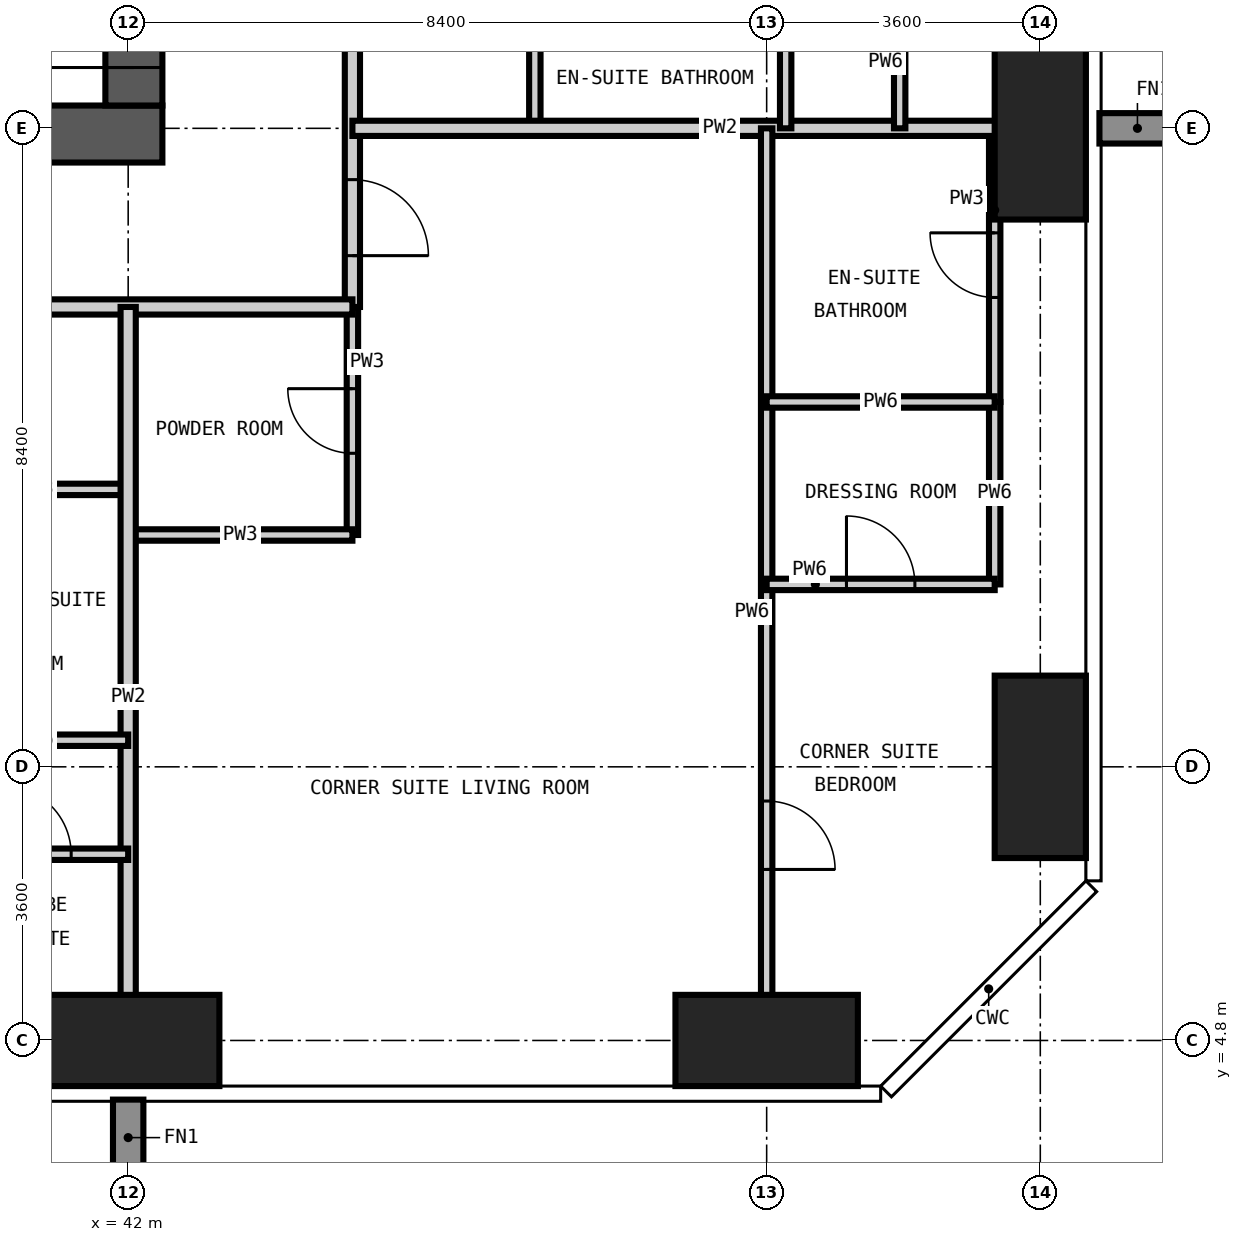
"""IFC4 building model, lengths in metres.
Left out: names, types, materials, properties, quantities, classifications, styles, units other than length and angle.
Written with IfcOpenShell. Run it as: python <this file> out.ifc"""

import sys

from ifc_helpers import new_model, si_unit, direction, frame, frame_2d, origin, origin_2d, place, context, subcontext, project, spatial, rectangle, extrude, element, fill, save


model = new_model("IFC4")
c1 = context("Model", 3, precision=1e-05, world=origin(), true_north=direction((0.0, 1.0)))
c2 = subcontext(c1, "Body", "Model", "MODEL_VIEW")
j1 = project(units=[si_unit("LENGTHUNIT", "METRE"), si_unit("PLANEANGLEUNIT", "RADIAN")], contexts=[c1])
p1 = place(None, origin())
s1 = spatial("IfcSite", under=j1, at=p1, CompositionType="ELEMENT")
p2 = place(p1, origin())
s2 = spatial("IfcBuilding", under=s1, at=p2, CompositionType="ELEMENT")
p3 = place(p2, frame((0.0, 0.0, 177.0)))
s3 = spatial("IfcBuildingStorey", under=s2, at=p3, CompositionType="ELEMENT", Elevation=177.0)
for number, where, z_axis, x_axis in (
    (1, (42.0, 4.8, -0.35), (0.0, 0.0, 1.0), (1.0, 0.0, 0.0)),
    (2, (50.4, 4.8, -0.35), (0.0, 0.0, 1.0), (1.0, 0.0, 0.0)),
):
    element("IfcColumn", number, at=place(p3, frame(where, z_axis=z_axis, x_axis=x_axis)), inside=s3, PredefinedType="COLUMN", context=c2, shape_type="SweptSolid", body=[
        extrude(rectangle(XDim=2.4, YDim=1.2, at=origin_2d()), origin(), (0.0, 0.0, 1.0), 3.6),
    ])
for number, where, z_axis, x_axis in (
    (3, (54.0, 8.4, -0.35), (0.0, 0.0, 1.0), (1.0, 0.0, 0.0)),
    (4, (54.0, 16.8, -0.35), (0.0, 0.0, 1.0), (1.0, 0.0, 0.0)),
):
    element("IfcColumn", number, at=place(p3, frame(where, z_axis=z_axis, x_axis=x_axis)), inside=s3, PredefinedType="COLUMN", context=c2, shape_type="SweptSolid", body=[
        extrude(rectangle(XDim=1.2, YDim=2.4, at=origin_2d()), origin(), (0.0, 0.0, 1.0), 3.6),
    ])
p4 = place(p3, frame((16.35, 16.725, -0.35), z_axis=(0.0, 0.0, 1.0), x_axis=(1.0, 0.0, 0.0)))
e5 = element("IfcWall", 5, at=p4, inside=s3, PredefinedType="SHEAR", context=c2, shape_type="SweptSolid", body=[
    extrude(rectangle(XDim=26.1, YDim=0.75, at=frame_2d((13.05, 0.0))), origin(), (0.0, 0.0, 1.0), 3.6),
])
p5 = place(p4, frame((12.55, 0.0, 0.35)))
e6 = element("IfcOpeningElement", 6, at=p5, cuts=e5, PredefinedType="OPENING", context=c2, shape_type="SweptSolid", body=[
    extrude(rectangle(XDim=1.0, YDim=2.1, at=frame_2d((0.5, 1.05))), frame((0.0, 0.385, 0.0), z_axis=(0.0, -1.0, 0.0), x_axis=(1.0, 0.0, 0.0)), (0.0, 0.0, 1.0), 0.77),
])
p6 = place(p4, frame((18.85, 0.0, 0.35)))
e7 = element("IfcOpeningElement", 7, at=p6, cuts=e5, PredefinedType="OPENING", context=c2, shape_type="SweptSolid", body=[
    extrude(rectangle(XDim=1.0, YDim=2.1, at=frame_2d((0.5, 1.05))), frame((0.0, 0.385, 0.0), z_axis=(0.0, -1.0, 0.0), x_axis=(1.0, 0.0, 0.0)), (0.0, 0.0, 1.0), 0.77),
])
p7 = place(p3, frame((42.075, 17.1, -0.35), z_axis=(0.0, 0.0, 1.0), x_axis=(0.0, 1.0, 0.0)))
e8 = element("IfcWall", 8, at=p7, inside=s3, PredefinedType="SHEAR", context=c2, shape_type="SweptSolid", body=[
    extrude(rectangle(XDim=24.6, YDim=0.75, at=frame_2d((12.3, 0.0))), origin(), (0.0, 0.0, 1.0), 3.6),
])
p8 = place(p7, frame((0.5, 0.0, 0.35)))
e9 = element("IfcOpeningElement", 9, at=p8, cuts=e8, PredefinedType="OPENING", context=c2, shape_type="SweptSolid", body=[
    extrude(rectangle(XDim=1.2, YDim=2.2, at=frame_2d((0.6, 1.1))), frame((0.0, 0.385, 0.0), z_axis=(0.0, -1.0, 0.0), x_axis=(1.0, 0.0, 0.0)), (0.0, 0.0, 1.0), 0.77),
])
p9 = place(p7, frame((11.8, 0.0, 0.35)))
e10 = element("IfcOpeningElement", 10, at=p9, cuts=e8, PredefinedType="OPENING", context=c2, shape_type="SweptSolid", body=[
    extrude(rectangle(XDim=1.0, YDim=2.1, at=frame_2d((0.5, 1.05))), frame((0.0, 0.385, 0.0), z_axis=(0.0, -1.0, 0.0), x_axis=(1.0, 0.0, 0.0)), (0.0, 0.0, 1.0), 0.77),
])
p10 = place(p7, frame((20.2, 0.0, 0.35)))
e11 = element("IfcOpeningElement", 11, at=p10, cuts=e8, PredefinedType="OPENING", context=c2, shape_type="SweptSolid", body=[
    extrude(rectangle(XDim=1.0, YDim=2.1, at=frame_2d((0.5, 1.05))), frame((0.0, 0.385, 0.0), z_axis=(0.0, -1.0, 0.0), x_axis=(1.0, 0.0, 0.0)), (0.0, 0.0, 1.0), 0.77),
])
p11 = place(p3, frame((44.95, 11.45, 0.0), z_axis=(0.0, 0.0, 1.0), x_axis=(0.0, 1.0, 0.0)))
e12 = element("IfcWall", 12, at=p11, inside=s3, PredefinedType="PARTITIONING", context=c2, shape_type="SweptSolid", body=[
    extrude(rectangle(XDim=3.0, YDim=0.15, at=frame_2d((1.5, 0.0))), origin(), (0.0, 0.0, 1.0), 3.25),
])
p12 = place(p11, frame((1.075, 0.0, 0.0)))
e13 = element("IfcOpeningElement", 13, at=p12, cuts=e12, PredefinedType="OPENING", context=c2, shape_type="SweptSolid", body=[
    extrude(rectangle(XDim=0.85, YDim=2.1, at=frame_2d((0.425, 1.05))), frame((0.0, 0.085, 0.0), z_axis=(0.0, -1.0, 0.0), x_axis=(1.0, 0.0, 0.0)), (0.0, 0.0, 1.0), 0.17),
])
p13 = place(p3, frame((47.35, 16.8, 0.0), z_axis=(0.0, 0.0, 1.0), x_axis=(0.0, 1.0, 0.0)))
e14 = element("IfcWall", 14, at=p13, inside=s3, PredefinedType="PARTITIONING", context=c2, shape_type="SweptSolid", body=[
    extrude(rectangle(XDim=2.4, YDim=0.15, at=frame_2d((1.2, 0.0))), origin(), (0.0, 0.0, 1.0), 3.25),
])
p14 = place(p3, frame((53.4, 13.2, 0.0), z_axis=(0.0, 0.0, 1.0), x_axis=(0.0, 1.0, 0.0)))
e15 = element("IfcWall", 15, at=p14, inside=s3, PredefinedType="PARTITIONING", context=c2, shape_type="SweptSolid", body=[
    extrude(rectangle(XDim=3.6, YDim=0.15, at=frame_2d((1.8, 0.0))), origin(), (0.0, 0.0, 1.0), 3.25),
])
p15 = place(p14, frame((1.375, 0.0, 0.0)))
e16 = element("IfcOpeningElement", 16, at=p15, cuts=e15, PredefinedType="OPENING", context=c2, shape_type="SweptSolid", body=[
    extrude(rectangle(XDim=0.85, YDim=2.1, at=frame_2d((0.425, 1.05))), frame((0.0, 0.085, 0.0), z_axis=(0.0, -1.0, 0.0), x_axis=(1.0, 0.0, 0.0)), (0.0, 0.0, 1.0), 0.17),
])
p16 = place(p3, frame((42.0, 11.45, 0.0), z_axis=(0.0, 0.0, 1.0), x_axis=(1.0, 0.0, 0.0)))
e17 = element("IfcWall", 17, at=p16, inside=s3, PredefinedType="PARTITIONING", context=c2, shape_type="SweptSolid", body=[
    extrude(rectangle(XDim=2.95, YDim=0.15, at=frame_2d((1.475, 0.0))), origin(), (0.0, 0.0, 1.0), 3.25),
])
p17 = place(p3, frame((39.6, 12.05, 0.0), z_axis=(0.0, 0.0, 1.0), x_axis=(1.0, 0.0, 0.0)))
e18 = element("IfcWall", 18, at=p17, inside=s3, PredefinedType="PARTITIONING", context=c2, shape_type="SweptSolid", body=[
    extrude(rectangle(XDim=2.4, YDim=0.15, at=frame_2d((1.2, 0.0))), origin(), (0.0, 0.0, 1.0), 3.25),
])
p18 = place(p3, frame((44.95, 45.55, 0.0), z_axis=(0.0, 0.0, 1.0), x_axis=(0.0, -1.0, 0.0)))
e19 = element("IfcWall", 19, at=p18, inside=s3, PredefinedType="PARTITIONING", context=c2, shape_type="SweptSolid", body=[
    extrude(rectangle(XDim=31.1, YDim=0.2, at=frame_2d((15.55, 0.0))), origin(), (0.0, 0.0, 1.0), 3.25),
])
p19 = place(p18, frame((26.15, 0.0, 0.0)))
e20 = element("IfcOpeningElement", 20, at=p19, cuts=e19, PredefinedType="OPENING", context=c2, shape_type="SweptSolid", body=[
    extrude(rectangle(XDim=1.0, YDim=2.2, at=frame_2d((0.5, 1.1))), frame((0.0, 0.11, 0.0), z_axis=(0.0, -1.0, 0.0), x_axis=(1.0, 0.0, 0.0)), (0.0, 0.0, 1.0), 0.22),
])
p20 = place(p18, frame((21.95, 0.0, 0.0)))
e21 = element("IfcOpeningElement", 21, at=p20, cuts=e19, PredefinedType="OPENING", context=c2, shape_type="SweptSolid", body=[
    extrude(rectangle(XDim=1.0, YDim=2.2, at=frame_2d((0.5, 1.1))), frame((0.0, 0.11, 0.0), z_axis=(0.0, -1.0, 0.0), x_axis=(1.0, 0.0, 0.0)), (0.0, 0.0, 1.0), 0.22),
])
p21 = place(p18, frame((17.75, 0.0, 0.0)))
e22 = element("IfcOpeningElement", 22, at=p21, cuts=e19, PredefinedType="OPENING", context=c2, shape_type="SweptSolid", body=[
    extrude(rectangle(XDim=1.0, YDim=2.2, at=frame_2d((0.5, 1.1))), frame((0.0, 0.11, 0.0), z_axis=(0.0, -1.0, 0.0), x_axis=(1.0, 0.0, 0.0)), (0.0, 0.0, 1.0), 0.22),
])
p22 = place(p18, frame((13.55, 0.0, 0.0)))
e23 = element("IfcOpeningElement", 23, at=p22, cuts=e19, PredefinedType="OPENING", context=c2, shape_type="SweptSolid", body=[
    extrude(rectangle(XDim=1.0, YDim=2.2, at=frame_2d((0.5, 1.1))), frame((0.0, 0.11, 0.0), z_axis=(0.0, -1.0, 0.0), x_axis=(1.0, 0.0, 0.0)), (0.0, 0.0, 1.0), 0.22),
])
p23 = place(p18, frame((9.35, 0.0, 0.0)))
e24 = element("IfcOpeningElement", 24, at=p23, cuts=e19, PredefinedType="OPENING", context=c2, shape_type="SweptSolid", body=[
    extrude(rectangle(XDim=1.0, YDim=2.2, at=frame_2d((0.5, 1.1))), frame((0.0, 0.11, 0.0), z_axis=(0.0, -1.0, 0.0), x_axis=(1.0, 0.0, 0.0)), (0.0, 0.0, 1.0), 0.22),
])
p24 = place(p18, frame((5.15, 0.0, 0.0)))
e25 = element("IfcOpeningElement", 25, at=p24, cuts=e19, PredefinedType="OPENING", context=c2, shape_type="SweptSolid", body=[
    extrude(rectangle(XDim=1.0, YDim=2.2, at=frame_2d((0.5, 1.1))), frame((0.0, 0.11, 0.0), z_axis=(0.0, -1.0, 0.0), x_axis=(1.0, 0.0, 0.0)), (0.0, 0.0, 1.0), 0.22),
])
p25 = place(p18, frame((29.425, 0.0, 0.0)))
e26 = element("IfcOpeningElement", 26, at=p25, cuts=e19, PredefinedType="OPENING", context=c2, shape_type="SweptSolid", body=[
    extrude(rectangle(XDim=1.0, YDim=2.2, at=frame_2d((0.5, 1.1))), frame((0.0, 0.11, 0.0), z_axis=(0.0, -1.0, 0.0), x_axis=(1.0, 0.0, 0.0)), (0.0, 0.0, 1.0), 0.22),
])
p26 = place(p18, frame((1.275, 0.0, 0.0)))
e27 = element("IfcOpeningElement", 27, at=p26, cuts=e19, PredefinedType="OPENING", context=c2, shape_type="SweptSolid", body=[
    extrude(rectangle(XDim=1.0, YDim=2.2, at=frame_2d((0.5, 1.1))), frame((0.0, 0.11, 0.0), z_axis=(0.0, -1.0, 0.0), x_axis=(1.0, 0.0, 0.0)), (0.0, 0.0, 1.0), 0.22),
])
p27 = place(p3, frame((44.95, 14.45, 0.0), z_axis=(0.0, 0.0, 1.0), x_axis=(-1.0, 0.0, 0.0)))
e28 = element("IfcWall", 28, at=p27, inside=s3, PredefinedType="PARTITIONING", context=c2, shape_type="SweptSolid", body=[
    extrude(rectangle(XDim=30.5, YDim=0.2, at=frame_2d((15.25, 0.0))), origin(), (0.0, 0.0, 1.0), 3.25),
])
p28 = place(p27, frame((24.65, 0.0, 0.0)))
e29 = element("IfcOpeningElement", 29, at=p28, cuts=e28, PredefinedType="OPENING", context=c2, shape_type="SweptSolid", body=[
    extrude(rectangle(XDim=1.0, YDim=2.2, at=frame_2d((0.5, 1.1))), frame((0.0, 0.11, 0.0), z_axis=(0.0, -1.0, 0.0), x_axis=(1.0, 0.0, 0.0)), (0.0, 0.0, 1.0), 0.22),
])
p29 = place(p27, frame((13.85, 0.0, 0.0)))
e30 = element("IfcOpeningElement", 30, at=p29, cuts=e28, PredefinedType="OPENING", context=c2, shape_type="SweptSolid", body=[
    extrude(rectangle(XDim=1.0, YDim=2.2, at=frame_2d((0.5, 1.1))), frame((0.0, 0.11, 0.0), z_axis=(0.0, -1.0, 0.0), x_axis=(1.0, 0.0, 0.0)), (0.0, 0.0, 1.0), 0.22),
])
p30 = place(p27, frame((7.85, 0.0, 0.0)))
e31 = element("IfcOpeningElement", 31, at=p30, cuts=e28, PredefinedType="OPENING", context=c2, shape_type="SweptSolid", body=[
    extrude(rectangle(XDim=1.0, YDim=2.2, at=frame_2d((0.5, 1.1))), frame((0.0, 0.11, 0.0), z_axis=(0.0, -1.0, 0.0), x_axis=(1.0, 0.0, 0.0)), (0.0, 0.0, 1.0), 0.22),
])
p31 = place(p3, frame((42.0, 4.182, 0.0), z_axis=(0.0, 0.0, 1.0), x_axis=(0.0, 1.0, 0.0)))
e32 = element("IfcWall", 32, at=p31, inside=s3, PredefinedType="PARTITIONING", context=c2, shape_type="SweptSolid", body=[
    extrude(rectangle(XDim=10.268, YDim=0.2, at=frame_2d((5.134, 0.0))), origin(), (0.0, 0.0, 1.0), 3.25),
])
p32 = place(p3, frame((44.95, 16.8, 0.0), z_axis=(0.0, 0.0, 1.0), x_axis=(1.0, 0.0, 0.0)))
e33 = element("IfcWall", 33, at=p32, inside=s3, PredefinedType="PARTITIONING", context=c2, shape_type="SweptSolid", body=[
    extrude(rectangle(XDim=9.668, YDim=0.2, at=frame_2d((4.834, 0.0))), origin(), (0.0, 0.0, 1.0), 3.25),
])
p33 = place(p3, frame((50.4, 4.182, 0.0), z_axis=(0.0, 0.0, 1.0), x_axis=(0.0, 1.0, 0.0)))
e34 = element("IfcWall", 34, at=p33, inside=s3, PredefinedType="PARTITIONING", context=c2, shape_type="SweptSolid", body=[
    extrude(rectangle(XDim=12.618, YDim=0.15, at=frame_2d((6.309, 0.0))), origin(), (0.0, 0.0, 1.0), 3.25),
])
p34 = place(p33, frame((2.868, 0.0, 0.0)))
e35 = element("IfcOpeningElement", 35, at=p34, cuts=e34, PredefinedType="OPENING", context=c2, shape_type="SweptSolid", body=[
    extrude(rectangle(XDim=0.9, YDim=2.1, at=frame_2d((0.45, 1.05))), frame((0.0, 0.085, 0.0), z_axis=(0.0, -1.0, 0.0), x_axis=(1.0, 0.0, 0.0)), (0.0, 0.0, 1.0), 0.17),
])
p35 = place(p3, frame((50.65, 16.8, 0.0), z_axis=(0.0, 0.0, 1.0), x_axis=(0.0, 1.0, 0.0)))
e36 = element("IfcWall", 36, at=p35, inside=s3, PredefinedType="PARTITIONING", context=c2, shape_type="SweptSolid", body=[
    extrude(rectangle(XDim=2.4, YDim=0.15, at=frame_2d((1.2, 0.0))), origin(), (0.0, 0.0, 1.0), 3.25),
])
p36 = place(p3, frame((52.15, 16.8, 0.0), z_axis=(0.0, 0.0, 1.0), x_axis=(0.0, 1.0, 0.0)))
e37 = element("IfcWall", 37, at=p36, inside=s3, PredefinedType="PARTITIONING", context=c2, shape_type="SweptSolid", body=[
    extrude(rectangle(XDim=2.4, YDim=0.15, at=frame_2d((1.2, 0.0))), origin(), (0.0, 0.0, 1.0), 3.25),
])
p37 = place(p36, frame((1.25, 0.0, 0.0)))
e38 = element("IfcOpeningElement", 38, at=p37, cuts=e37, PredefinedType="OPENING", context=c2, shape_type="SweptSolid", body=[
    extrude(rectangle(XDim=0.9, YDim=2.1, at=frame_2d((0.45, 1.05))), frame((0.0, 0.085, 0.0), z_axis=(0.0, -1.0, 0.0), x_axis=(1.0, 0.0, 0.0)), (0.0, 0.0, 1.0), 0.17),
])
p38 = place(p3, frame((53.4, 10.8, 0.0), z_axis=(0.0, 0.0, 1.0), x_axis=(0.0, 1.0, 0.0)))
e39 = element("IfcWall", 39, at=p38, inside=s3, PredefinedType="PARTITIONING", context=c2, shape_type="SweptSolid", body=[
    extrude(rectangle(XDim=2.4, YDim=0.15, at=frame_2d((1.2, 0.0))), origin(), (0.0, 0.0, 1.0), 3.25),
])
p39 = place(p3, frame((39.6, 7.25, 0.0), z_axis=(0.0, 0.0, 1.0), x_axis=(1.0, 0.0, 0.0)))
e40 = element("IfcWall", 40, at=p39, inside=s3, PredefinedType="PARTITIONING", context=c2, shape_type="SweptSolid", body=[
    extrude(rectangle(XDim=2.4, YDim=0.15, at=frame_2d((1.2, 0.0))), origin(), (0.0, 0.0, 1.0), 3.25),
])
p40 = place(p39, frame((0.75, 0.0, 0.0)))
e41 = element("IfcOpeningElement", 41, at=p40, cuts=e40, PredefinedType="OPENING", context=c2, shape_type="SweptSolid", body=[
    extrude(rectangle(XDim=0.9, YDim=2.1, at=frame_2d((0.45, 1.05))), frame((0.0, 0.085, 0.0), z_axis=(0.0, -1.0, 0.0), x_axis=(1.0, 0.0, 0.0)), (0.0, 0.0, 1.0), 0.17),
])
p41 = place(p3, frame((39.6, 8.75, 0.0), z_axis=(0.0, 0.0, 1.0), x_axis=(1.0, 0.0, 0.0)))
e42 = element("IfcWall", 42, at=p41, inside=s3, PredefinedType="PARTITIONING", context=c2, shape_type="SweptSolid", body=[
    extrude(rectangle(XDim=2.4, YDim=0.15, at=frame_2d((1.2, 0.0))), origin(), (0.0, 0.0, 1.0), 3.25),
])
p42 = place(p3, frame((50.4, 10.8, 0.0), z_axis=(0.0, 0.0, 1.0), x_axis=(1.0, 0.0, 0.0)))
e43 = element("IfcWall", 43, at=p42, inside=s3, PredefinedType="PARTITIONING", context=c2, shape_type="SweptSolid", body=[
    extrude(rectangle(XDim=3.0, YDim=0.15, at=frame_2d((1.5, 0.0))), origin(), (0.0, 0.0, 1.0), 3.25),
])
p43 = place(p42, frame((1.05, 0.0, 0.0)))
e44 = element("IfcOpeningElement", 44, at=p43, cuts=e43, PredefinedType="OPENING", context=c2, shape_type="SweptSolid", body=[
    extrude(rectangle(XDim=0.9, YDim=2.1, at=frame_2d((0.45, 1.05))), frame((0.0, 0.085, 0.0), z_axis=(0.0, -1.0, 0.0), x_axis=(1.0, 0.0, 0.0)), (0.0, 0.0, 1.0), 0.17),
])
p44 = place(p3, frame((50.4, 13.2, 0.0), z_axis=(0.0, 0.0, 1.0), x_axis=(1.0, 0.0, 0.0)))
e45 = element("IfcWall", 45, at=p44, inside=s3, PredefinedType="PARTITIONING", context=c2, shape_type="SweptSolid", body=[
    extrude(rectangle(XDim=3.0, YDim=0.15, at=frame_2d((1.5, 0.0))), origin(), (0.0, 0.0, 1.0), 3.25),
])
p45 = place(p8, origin())
e46 = element("IfcDoor", 46, at=p45, inside=s3, OperationType="SINGLE_SWING_LEFT", PredefinedType="DOOR", context=c2, shape_type="SweptSolid", body=[
    extrude(rectangle(XDim=1.2, YDim=2.2, at=frame_2d((0.6, 1.1))), frame((0.0, 0.025, 0.0), z_axis=(0.0, -1.0, 0.0), x_axis=(1.0, 0.0, 0.0)), (0.0, 0.0, 1.0), 0.05),
])
fill(e9, e46)
p46 = place(p40, origin())
e47 = element("IfcDoor", 47, at=p46, inside=s3, OperationType="SINGLE_SWING_LEFT", PredefinedType="DOOR", context=c2, shape_type="SweptSolid", body=[
    extrude(rectangle(XDim=0.9, YDim=2.1, at=frame_2d((0.45, 1.05))), frame((0.0, 0.025, 0.0), z_axis=(0.0, -1.0, 0.0), x_axis=(1.0, 0.0, 0.0)), (0.0, 0.0, 1.0), 0.05),
])
fill(e41, e47)
p47 = place(p25, origin())
e48 = element("IfcDoor", 48, at=p47, inside=s3, OperationType="SINGLE_SWING_RIGHT", PredefinedType="DOOR", context=c2, shape_type="SweptSolid", body=[
    extrude(rectangle(XDim=1.0, YDim=2.2, at=frame_2d((0.5, 1.1))), frame((0.0, 0.025, 0.0), z_axis=(0.0, -1.0, 0.0), x_axis=(1.0, 0.0, 0.0)), (0.0, 0.0, 1.0), 0.05),
])
fill(e26, e48)
p48 = place(p12, origin())
e49 = element("IfcDoor", 49, at=p48, inside=s3, OperationType="SINGLE_SWING_RIGHT", PredefinedType="DOOR", context=c2, shape_type="SweptSolid", body=[
    extrude(rectangle(XDim=0.85, YDim=2.1, at=frame_2d((0.425, 1.05))), frame((0.0, 0.025, 0.0), z_axis=(0.0, -1.0, 0.0), x_axis=(1.0, 0.0, 0.0)), (0.0, 0.0, 1.0), 0.05),
])
fill(e13, e49)
p49 = place(p34, frame((0.9, 0.0, 0.0), z_axis=(0.0, 0.0, 1.0), x_axis=(-1.0, 0.0, 0.0)))
e50 = element("IfcDoor", 50, at=p49, inside=s3, OperationType="SINGLE_SWING_RIGHT", PredefinedType="DOOR", context=c2, shape_type="SweptSolid", body=[
    extrude(rectangle(XDim=0.9, YDim=2.1, at=frame_2d((0.45, 1.05))), frame((0.0, 0.025, 0.0), z_axis=(0.0, -1.0, 0.0), x_axis=(1.0, 0.0, 0.0)), (0.0, 0.0, 1.0), 0.05),
])
fill(e35, e50)
p50 = place(p15, origin())
e51 = element("IfcDoor", 51, at=p50, inside=s3, OperationType="SINGLE_SWING_RIGHT", PredefinedType="DOOR", context=c2, shape_type="SweptSolid", body=[
    extrude(rectangle(XDim=0.85, YDim=2.1, at=frame_2d((0.425, 1.05))), frame((0.0, 0.025, 0.0), z_axis=(0.0, -1.0, 0.0), x_axis=(1.0, 0.0, 0.0)), (0.0, 0.0, 1.0), 0.05),
])
fill(e16, e51)
p51 = place(p43, origin())
e52 = element("IfcDoor", 52, at=p51, inside=s3, OperationType="SINGLE_SWING_LEFT", PredefinedType="DOOR", context=c2, shape_type="SweptSolid", body=[
    extrude(rectangle(XDim=0.9, YDim=2.1, at=frame_2d((0.45, 1.05))), frame((0.0, 0.025, 0.0), z_axis=(0.0, -1.0, 0.0), x_axis=(1.0, 0.0, 0.0)), (0.0, 0.0, 1.0), 0.05),
])
fill(e44, e52)
save(model, sys.argv[1])
